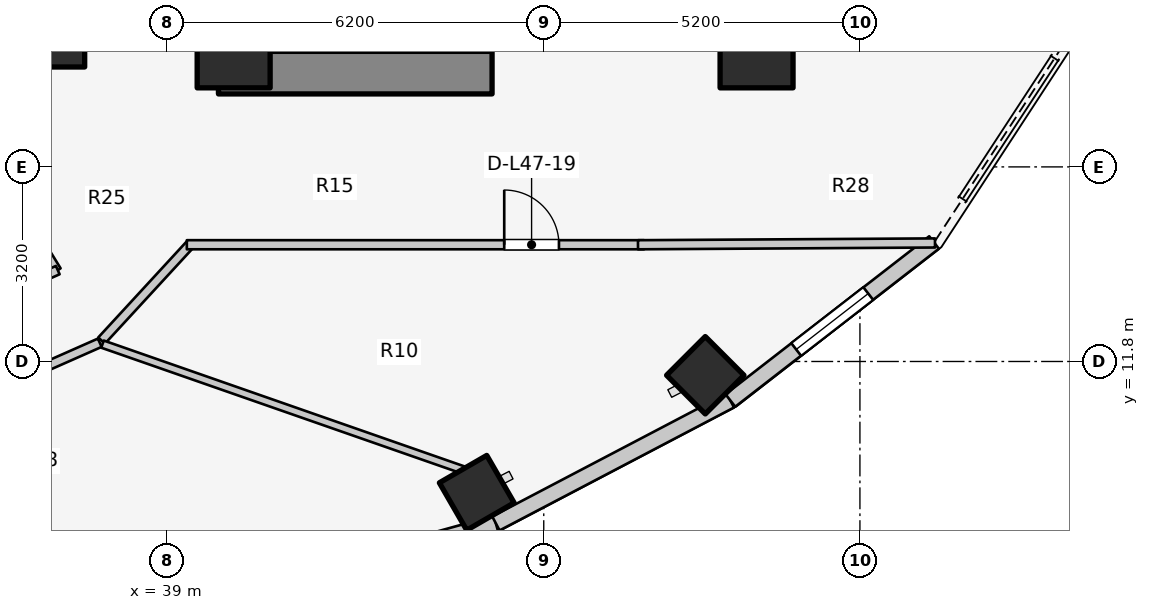
"""IFC4 building model, lengths in metres.
Left out: names, types, materials, properties, quantities, classifications, styles, units other than length and angle.
Written with IfcOpenShell. Run it as: python <this file> out.ifc"""

import sys

from ifc_helpers import new_model, si_unit, direction, frame, frame_2d, origin, origin_2d, place, context, subcontext, project, spatial, rectangle, extrude, element, fill, save


model = new_model("IFC4")
c1 = context("Model", 3, precision=1e-05, world=origin(), true_north=direction((0.0, 1.0)))
c2 = subcontext(c1, "Body", "Model", "MODEL_VIEW")
j1 = project(units=[si_unit("LENGTHUNIT", "METRE"), si_unit("PLANEANGLEUNIT", "RADIAN")], contexts=[c1])
p1 = place(None, origin())
s1 = spatial("IfcSite", under=j1, at=p1, CompositionType="ELEMENT")
p2 = place(p1, origin())
s2 = spatial("IfcBuilding", under=s1, at=p2, CompositionType="ELEMENT")
p3 = place(p2, frame((0.0, 0.0, 156.0)))
s3 = spatial("IfcBuildingStorey", under=s2, at=p3, CompositionType="ELEMENT", Elevation=156.0)
p4 = place(p3, frame((39.85, 16.55, 0.0), z_axis=(0.0, 0.0, 1.0), x_axis=(1.0, 0.0, 0.0)))
e1 = element("IfcWall", 1, at=p4, inside=s3, PredefinedType="SHEAR", context=c2, shape_type="SweptSolid", body=[
    extrude(rectangle(XDim=4.5, YDim=0.7, at=frame_2d((2.25, 0.0))), origin(), (0.0, 0.0, 1.0), 3.1),
])
for number, where, z_axis, x_axis in (
    (2, (40.1, 16.9, 0.0), (0.0, 0.0, 1.0), (1.0, 0.0, 0.0)),
    (3, (48.7, 16.9, 0.0), (0.0, 0.0, 1.0), (1.0, 0.0, 0.0)),
):
    element("IfcColumn", number, at=place(p3, frame(where, z_axis=z_axis, x_axis=x_axis)), inside=s3, PredefinedType="COLUMN", context=c2, shape_type="SweptSolid", body=[
        extrude(rectangle(XDim=1.2, YDim=1.2, at=origin_2d()), origin(), (0.0, 0.0, 1.0), 3.1),
    ])
p5 = place(p3, frame((44.098, 9.641, 0.0), z_axis=(0.0, 0.0, 1.0), x_axis=(0.5, -0.866025403784, 0.0)))
e4 = element("IfcColumn", 4, at=p5, inside=s3, PredefinedType="COLUMN", context=c2, shape_type="SweptSolid", body=[
    extrude(rectangle(XDim=0.9, YDim=0.9, at=origin_2d()), origin(), (0.0, 0.0, 1.0), 3.1),
])
p6 = place(p3, frame((37.275, 17.018, 0.0), z_axis=(0.0, 0.0, 1.0), x_axis=(1.0, 0.0, 0.0)))
e5 = element("IfcColumn", 5, at=p6, inside=s3, PredefinedType="COLUMN", context=c2, shape_type="SweptSolid", body=[
    extrude(rectangle(XDim=0.75, YDim=0.75, at=origin_2d()), origin(), (0.0, 0.0, 1.0), 3.1),
])
p7 = place(p3, frame((47.857, 11.573, 0.0), z_axis=(0.0, 0.0, 1.0), x_axis=(0.707106781187, -0.707106781187, 0.0)))
e6 = element("IfcColumn", 6, at=p7, inside=s3, PredefinedType="COLUMN", context=c2, shape_type="SweptSolid", body=[
    extrude(rectangle(XDim=0.9, YDim=0.9, at=origin_2d()), origin(), (0.0, 0.0, 1.0), 3.1),
])
p8 = place(p3, frame((39.365, 7.743, 0.0), z_axis=(0.0, 0.0, 1.0), x_axis=(0.963953455704, 0.26607092144, 0.0)))
e7 = element("IfcWall", 7, at=p8, inside=s3, PredefinedType="STANDARD", context=c2, shape_type="SweptSolid", body=[
    extrude(rectangle(XDim=5.237, YDim=0.26, at=frame_2d((2.618, 0.0))), origin(), (0.0, 0.0, 1.0), 2.85),
])
p9 = place(p8, frame((1.418, 0.0, 0.75)))
e8 = element("IfcOpeningElement", 8, at=p9, cuts=e7, PredefinedType="OPENING", context=c2, shape_type="SweptSolid", body=[
    extrude(rectangle(XDim=2.4, YDim=1.7, at=frame_2d((1.2, 0.85))), frame((0.0, 0.14, 0.0), z_axis=(0.0, -1.0, 0.0), x_axis=(1.0, 0.0, 0.0)), (0.0, 0.0, 1.0), 0.28),
])
p10 = place(p3, frame((44.413, 9.137, 0.0), z_axis=(0.0, 0.0, 1.0), x_axis=(0.885660265226, 0.464333818065, 0.0)))
e9 = element("IfcWall", 9, at=p10, inside=s3, PredefinedType="STANDARD", context=c2, shape_type="SweptSolid", body=[
    extrude(rectangle(XDim=4.354, YDim=0.26, at=frame_2d((2.177, 0.0))), origin(), (0.0, 0.0, 1.0), 2.85),
])
p11 = place(p3, frame((48.269, 11.158, 0.0), z_axis=(0.0, 0.0, 1.0), x_axis=(0.790185650662, 0.612867552973, 0.0)))
e10 = element("IfcWall", 10, at=p11, inside=s3, PredefinedType="STANDARD", context=c2, shape_type="SweptSolid", body=[
    extrude(rectangle(XDim=4.239, YDim=0.26, at=frame_2d((2.12, 0.0))), origin(), (0.0, 0.0, 1.0), 2.85),
])
p12 = place(p11, frame((1.37, 0.0, 0.75)))
e11 = element("IfcOpeningElement", 11, at=p12, cuts=e10, PredefinedType="OPENING", context=c2, shape_type="SweptSolid", body=[
    extrude(rectangle(XDim=1.5, YDim=1.6, at=frame_2d((0.75, 0.8))), frame((0.0, 0.14, 0.0), z_axis=(0.0, -1.0, 0.0), x_axis=(1.0, 0.0, 0.0)), (0.0, 0.0, 1.0), 0.28),
])
p13 = place(p3, frame((37.928, 12.144, 0.0), z_axis=(0.0, 0.0, 1.0), x_axis=(0.677579737957, 0.735449317567, 0.0)))
e12 = element("IfcWall", 12, at=p13, inside=s3, PredefinedType="PARTITIONING", context=c2, shape_type="SweptSolid", body=[
    extrude(rectangle(XDim=2.173, YDim=0.15, at=frame_2d((1.086, 0.0))), origin(), (0.0, 0.0, 1.0), 2.299),
])
p14 = place(p3, frame((39.33, 13.72, 0.0), z_axis=(0.0, 0.0, 1.0), x_axis=(1.0, 0.0, 0.0)))
e13 = element("IfcWall", 13, at=p14, inside=s3, PredefinedType="PARTITIONING", context=c2, shape_type="SweptSolid", body=[
    extrude(rectangle(XDim=7.52, YDim=0.15, at=frame_2d((3.76, 0.0))), origin(), (0.0, 0.0, 1.0), 2.299),
])
p15 = place(p14, frame((5.22, 0.0, 0.0)))
e14 = element("IfcOpeningElement", 14, at=p15, cuts=e13, PredefinedType="OPENING", context=c2, shape_type="SweptSolid", body=[
    extrude(rectangle(XDim=0.9, YDim=2.1, at=frame_2d((0.45, 1.05))), frame((0.0, 0.085, 0.0), z_axis=(0.0, -1.0, 0.0), x_axis=(1.0, 0.0, 0.0)), (0.0, 0.0, 1.0), 0.17),
])
p16 = place(p3, frame((46.75, 13.72, 0.0), z_axis=(0.0, 0.0, 1.0), x_axis=(0.999981712056, 0.006047772638, 0.0)))
e15 = element("IfcWall", 15, at=p16, inside=s3, PredefinedType="PARTITIONING", context=c2, shape_type="SweptSolid", body=[
    extrude(rectangle(XDim=4.885, YDim=0.15, at=frame_2d((2.442, 0.0))), origin(), (0.0, 0.0, 1.0), 2.22),
])
p17 = place(p3, frame((35.55, 15.985, 0.0), z_axis=(0.0, 0.0, 1.0), x_axis=(0.523587550846, -0.851971875474, 0.0)))
e16 = element("IfcWall", 16, at=p17, inside=s3, PredefinedType="PARTITIONING", context=c2, shape_type="SweptSolid", body=[
    extrude(rectangle(XDim=3.153, YDim=0.125, at=frame_2d((1.577, 0.0))), origin(), (0.0, 0.0, 1.0), 2.299),
])
p18 = place(p3, frame((34.69, 12.179, 0.0), z_axis=(0.0, 0.0, 1.0), x_axis=(0.913145536541, 0.407633694749, 0.0)))
e17 = element("IfcWall", 17, at=p18, inside=s3, PredefinedType="PARTITIONING", context=c2, shape_type="SweptSolid", body=[
    extrude(rectangle(XDim=2.756, YDim=0.15, at=frame_2d((1.378, 0.0))), origin(), (0.0, 0.0, 1.0), 2.299),
])
p19 = place(p18, frame((0.903, 0.0, 0.0)))
e18 = element("IfcOpeningElement", 18, at=p19, cuts=e17, PredefinedType="OPENING", context=c2, shape_type="SweptSolid", body=[
    extrude(rectangle(XDim=0.95, YDim=2.1, at=frame_2d((0.475, 1.05))), frame((0.0, 0.085, 0.0), z_axis=(0.0, -1.0, 0.0), x_axis=(1.0, 0.0, 0.0)), (0.0, 0.0, 1.0), 0.17),
])
p20 = place(p3, frame((37.943, 12.086, 0.0), z_axis=(0.0, 0.0, 1.0), x_axis=(0.944182779284, -0.329422038278, 0.0)))
e19 = element("IfcWall", 19, at=p20, inside=s3, PredefinedType="PARTITIONING", context=c2, shape_type="SweptSolid", body=[
    extrude(rectangle(XDim=6.291, YDim=0.125, at=frame_2d((3.146, 0.0))), origin(), (0.0, 0.0, 1.0), 2.299),
])
p21 = place(p3, frame((35.042, 10.844, 0.0), z_axis=(0.0, 0.0, 1.0), x_axis=(0.914519212393, 0.40454247016, 0.0)))
e20 = element("IfcWall", 20, at=p21, inside=s3, PredefinedType="PARTITIONING", context=c2, shape_type="SweptSolid", body=[
    extrude(rectangle(XDim=3.124, YDim=0.15, at=frame_2d((1.562, 0.0))), origin(), (0.0, 0.0, 1.0), 2.299),
])
p22 = place(p21, frame((1.062, 0.0, 0.0)))
e21 = element("IfcOpeningElement", 21, at=p22, cuts=e20, PredefinedType="OPENING", context=c2, shape_type="SweptSolid", body=[
    extrude(rectangle(XDim=1.0, YDim=2.1, at=frame_2d((0.5, 1.05))), frame((0.0, 0.085, 0.0), z_axis=(0.0, -1.0, 0.0), x_axis=(1.0, 0.0, 0.0)), (0.0, 0.0, 1.0), 0.17),
])
p23 = place(p12, origin())
e22 = element("IfcWindow", 22, at=p23, inside=s3, PartitioningType="SINGLE_PANEL", PredefinedType="WINDOW", context=c2, shape_type="SweptSolid", body=[
    extrude(rectangle(XDim=1.5, YDim=1.6, at=frame_2d((0.75, 0.8))), frame((0.0, 0.03, 0.0), z_axis=(0.0, -1.0, 0.0), x_axis=(1.0, 0.0, 0.0)), (0.0, 0.0, 1.0), 0.06),
])
fill(e11, e22)
p24 = place(p15, origin())
e23 = element("IfcDoor", 23, at=p24, inside=s3, OperationType="SINGLE_SWING_LEFT", PredefinedType="DOOR", context=c2, shape_type="SweptSolid", body=[
    extrude(rectangle(XDim=0.9, YDim=2.1, at=frame_2d((0.45, 1.05))), frame((0.0, 0.025, 0.0), z_axis=(0.0, -1.0, 0.0), x_axis=(1.0, 0.0, 0.0)), (0.0, 0.0, 1.0), 0.05),
])
fill(e14, e23)
save(model, sys.argv[1])
